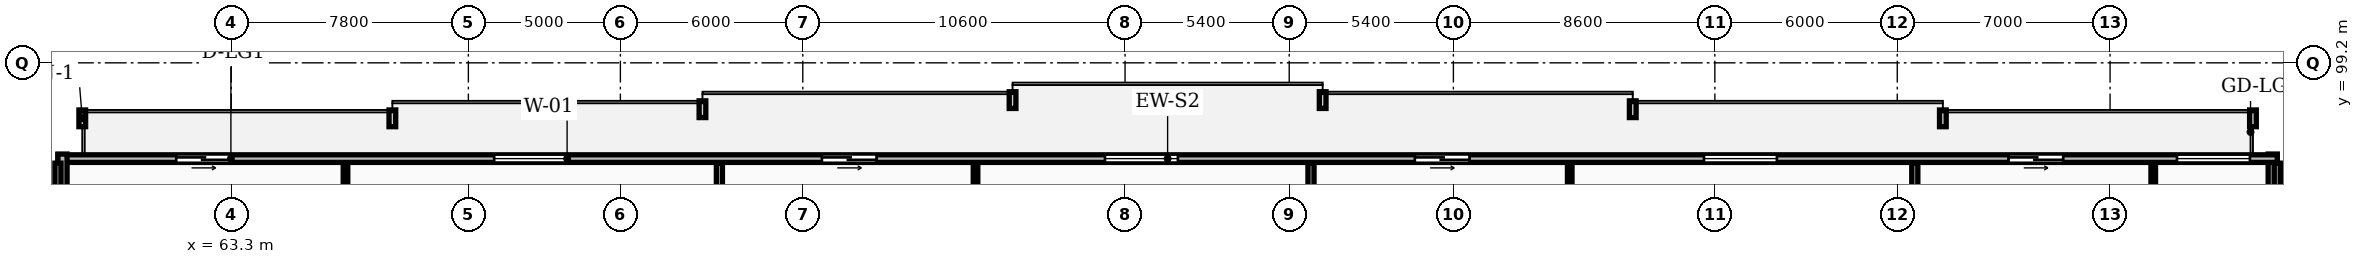
"""IFC4 building model, lengths in metres.
Left out: names, types, materials, properties, quantities, classifications, styles, units other than length and angle.
Written with IfcOpenShell. Run it as: python <this file> out.ifc"""

import sys

from ifc_helpers import new_model, si_unit, direction, frame, frame_2d, origin, place, context, subcontext, project, spatial, rectangle, extrude, element, fill, save


model = new_model("IFC4")
c1 = context("Model", 3, precision=1e-05, world=origin(), true_north=direction((0.0, 1.0)))
c2 = subcontext(c1, "Body", "Model", "MODEL_VIEW")
j1 = project(units=[si_unit("LENGTHUNIT", "METRE"), si_unit("PLANEANGLEUNIT", "RADIAN")], contexts=[c1])
p1 = place(None, origin())
s1 = spatial("IfcSite", under=j1, at=p1, CompositionType="ELEMENT")
p2 = place(p1, origin())
s2 = spatial("IfcBuilding", under=s1, at=p2, CompositionType="ELEMENT")
p3 = place(p2, frame((0.0, 0.0, 150.1)))
s3 = spatial("IfcBuildingStorey", under=s2, at=p3, CompositionType="ELEMENT", Elevation=150.1)
p4 = place(p3, frame((130.45, 92.6, 0.0), z_axis=(0.0, 0.0, 1.0), x_axis=(0.0, 1.0, 0.0)))
e1 = element("IfcWall", 1, at=p4, inside=s3, PredefinedType="STANDARD", context=c2, shape_type="SweptSolid", body=[
    extrude(rectangle(XDim=3.6, YDim=0.3, at=frame_2d((1.8, 0.0))), origin(), (0.0, 0.0, 1.0), 3.31),
])
p5 = place(p3, frame((130.6, 96.05, 0.0), z_axis=(0.0, 0.0, 1.0), x_axis=(-1.0, 0.0, 0.0)))
e2 = element("IfcWall", 2, at=p5, inside=s3, PredefinedType="STANDARD", context=c2, shape_type="SweptSolid", body=[
    extrude(rectangle(XDim=73.0, YDim=0.25, at=frame_2d((36.5, 0.0))), origin(), (0.0, 0.0, 1.0), 3.31),
])
p6 = place(p5, frame((67.311, 0.0, 0.0)))
e3 = element("IfcOpeningElement", 3, at=p6, cuts=e2, PredefinedType="OPENING", context=c2, shape_type="SweptSolid", body=[
    extrude(rectangle(XDim=1.8, YDim=2.2, at=frame_2d((0.9, 1.1))), frame((0.0, 0.135, 0.0), z_axis=(0.0, -1.0, 0.0), x_axis=(1.0, 0.0, 0.0)), (0.0, 0.0, 1.0), 0.27),
])
p7 = place(p5, frame((56.252, 0.0, 0.85)))
e4 = element("IfcOpeningElement", 4, at=p7, cuts=e2, PredefinedType="OPENING", context=c2, shape_type="SweptSolid", body=[
    extrude(rectangle(XDim=2.4, YDim=1.9, at=frame_2d((1.2, 0.95))), frame((0.0, 0.135, 0.0), z_axis=(0.0, -1.0, 0.0), x_axis=(1.0, 0.0, 0.0)), (0.0, 0.0, 1.0), 0.27),
])
p8 = place(p5, frame((46.071, 0.0, 0.0)))
e5 = element("IfcOpeningElement", 5, at=p8, cuts=e2, PredefinedType="OPENING", context=c2, shape_type="SweptSolid", body=[
    extrude(rectangle(XDim=1.8, YDim=2.2, at=frame_2d((0.9, 1.1))), frame((0.0, 0.135, 0.0), z_axis=(0.0, -1.0, 0.0), x_axis=(1.0, 0.0, 0.0)), (0.0, 0.0, 1.0), 0.27),
])
p9 = place(p5, frame((36.161, 0.0, 0.85)))
e6 = element("IfcOpeningElement", 6, at=p9, cuts=e2, PredefinedType="OPENING", context=c2, shape_type="SweptSolid", body=[
    extrude(rectangle(XDim=2.4, YDim=1.9, at=frame_2d((1.2, 0.95))), frame((0.0, 0.135, 0.0), z_axis=(0.0, -1.0, 0.0), x_axis=(1.0, 0.0, 0.0)), (0.0, 0.0, 1.0), 0.27),
])
p10 = place(p5, frame((26.569, 0.0, 0.0)))
e7 = element("IfcOpeningElement", 7, at=p10, cuts=e2, PredefinedType="OPENING", context=c2, shape_type="SweptSolid", body=[
    extrude(rectangle(XDim=1.8, YDim=2.2, at=frame_2d((0.9, 1.1))), frame((0.0, 0.135, 0.0), z_axis=(0.0, -1.0, 0.0), x_axis=(1.0, 0.0, 0.0)), (0.0, 0.0, 1.0), 0.27),
])
p11 = place(p5, frame((16.458, 0.0, 0.85)))
e8 = element("IfcOpeningElement", 8, at=p11, cuts=e2, PredefinedType="OPENING", context=c2, shape_type="SweptSolid", body=[
    extrude(rectangle(XDim=2.4, YDim=1.9, at=frame_2d((1.2, 0.95))), frame((0.0, 0.135, 0.0), z_axis=(0.0, -1.0, 0.0), x_axis=(1.0, 0.0, 0.0)), (0.0, 0.0, 1.0), 0.27),
])
p12 = place(p5, frame((7.042, 0.0, 0.0)))
e9 = element("IfcOpeningElement", 9, at=p12, cuts=e2, PredefinedType="OPENING", context=c2, shape_type="SweptSolid", body=[
    extrude(rectangle(XDim=1.8, YDim=2.2, at=frame_2d((0.9, 1.1))), frame((0.0, 0.135, 0.0), z_axis=(0.0, -1.0, 0.0), x_axis=(1.0, 0.0, 0.0)), (0.0, 0.0, 1.0), 0.27),
])
p13 = place(p5, frame((0.9, 0.0, 0.85)))
e10 = element("IfcOpeningElement", 10, at=p13, cuts=e2, PredefinedType="OPENING", context=c2, shape_type="SweptSolid", body=[
    extrude(rectangle(XDim=2.4, YDim=1.9, at=frame_2d((1.2, 0.95))), frame((0.0, 0.135, 0.0), z_axis=(0.0, -1.0, 0.0), x_axis=(1.0, 0.0, 0.0)), (0.0, 0.0, 1.0), 0.27),
])
p14 = place(p3, frame((57.75, 96.2, 0.0), z_axis=(0.0, 0.0, 1.0), x_axis=(0.0, -1.0, 0.0)))
e11 = element("IfcWall", 11, at=p14, inside=s3, PredefinedType="STANDARD", context=c2, shape_type="SweptSolid", body=[
    extrude(rectangle(XDim=3.6, YDim=0.3, at=frame_2d((1.8, 0.0))), origin(), (0.0, 0.0, 1.0), 3.31),
])
for number, where, z_axis, x_axis in (
    (12, (57.6, 69.83, 0.0), (0.0, 0.0, 1.0), (0.0, 1.0, 0.0)),
    (13, (130.6, 69.83, 0.0), (0.0, 0.0, 1.0), (0.0, 1.0, 0.0)),
    (14, (79.357, 69.83, 0.0), (0.0, 0.0, 1.0), (0.0, 1.0, 0.0)),
):
    element("IfcWall", number, at=place(p3, frame(where, z_axis=z_axis, x_axis=x_axis)), inside=s3, PredefinedType="PARTITIONING", context=c2, shape_type="SweptSolid", body=[
        extrude(rectangle(XDim=26.07, YDim=0.2, at=frame_2d((13.035, 0.0))), origin(), (0.0, 0.0, 1.0), 3.31),
    ])
p15 = place(p3, frame((67.059, 91.43, 0.0), z_axis=(0.0, 0.0, 1.0), x_axis=(0.0, 1.0, 0.0)))
e15 = element("IfcWall", 15, at=p15, inside=s3, PredefinedType="PARTITIONING", context=c2, shape_type="SweptSolid", body=[
    extrude(rectangle(XDim=4.47, YDim=0.15, at=frame_2d((2.235, 0.0))), origin(), (0.0, 0.0, 1.0), 3.31),
])
p16 = place(p3, frame((98.816, 69.83, 0.0), z_axis=(0.0, 0.0, 1.0), x_axis=(0.0, 1.0, 0.0)))
e16 = element("IfcWall", 16, at=p16, inside=s3, PredefinedType="PARTITIONING", context=c2, shape_type="SweptSolid", body=[
    extrude(rectangle(XDim=26.07, YDim=0.2, at=frame_2d((13.035, 0.0))), origin(), (0.0, 0.0, 1.0), 3.31),
])
p17 = place(p3, frame((87.781, 91.43, 0.0), z_axis=(0.0, 0.0, 1.0), x_axis=(0.0, 1.0, 0.0)))
e17 = element("IfcWall", 17, at=p17, inside=s3, PredefinedType="PARTITIONING", context=c2, shape_type="SweptSolid", body=[
    extrude(rectangle(XDim=4.47, YDim=0.15, at=frame_2d((2.235, 0.0))), origin(), (0.0, 0.0, 1.0), 3.31),
])
p18 = place(p3, frame((118.677, 69.83, 0.0), z_axis=(0.0, 0.0, 1.0), x_axis=(0.0, 1.0, 0.0)))
e18 = element("IfcWall", 18, at=p18, inside=s3, PredefinedType="PARTITIONING", context=c2, shape_type="SweptSolid", body=[
    extrude(rectangle(XDim=26.07, YDim=0.2, at=frame_2d((13.035, 0.0))), origin(), (0.0, 0.0, 1.0), 3.31),
])
p19 = place(p3, frame((107.327, 91.43, 0.0), z_axis=(0.0, 0.0, 1.0), x_axis=(0.0, 1.0, 0.0)))
e19 = element("IfcWall", 19, at=p19, inside=s3, PredefinedType="PARTITIONING", context=c2, shape_type="SweptSolid", body=[
    extrude(rectangle(XDim=4.47, YDim=0.15, at=frame_2d((2.235, 0.0))), origin(), (0.0, 0.0, 1.0), 3.31),
])
p20 = place(p3, frame((126.52, 86.29, 0.0), z_axis=(0.0, 0.0, 1.0), x_axis=(0.0, 1.0, 0.0)))
e20 = element("IfcWall", 20, at=p20, inside=s3, PredefinedType="PARTITIONING", context=c2, shape_type="SweptSolid", body=[
    extrude(rectangle(XDim=9.61, YDim=0.15, at=frame_2d((4.805, 0.0))), origin(), (0.0, 0.0, 1.0), 3.31),
])
p21 = place(p20, frame((1.43, 0.0, 0.0)))
e21 = element("IfcOpeningElement", 21, at=p21, cuts=e20, PredefinedType="OPENING", context=c2, shape_type="SweptSolid", body=[
    extrude(rectangle(XDim=0.84, YDim=2.04, at=frame_2d((0.42, 1.02))), frame((0.0, 0.085, 0.0), z_axis=(0.0, -1.0, 0.0), x_axis=(1.0, 0.0, 0.0)), (0.0, 0.0, 1.0), 0.17),
])
p22 = place(p20, frame((2.705, 0.0, 0.0)))
e22 = element("IfcOpeningElement", 22, at=p22, cuts=e20, PredefinedType="OPENING", context=c2, shape_type="SweptSolid", body=[
    extrude(rectangle(XDim=0.84, YDim=2.04, at=frame_2d((0.42, 1.02))), frame((0.0, 0.085, 0.0), z_axis=(0.0, -1.0, 0.0), x_axis=(1.0, 0.0, 0.0)), (0.0, 0.0, 1.0), 0.17),
])
p23 = place(p20, frame((6.314, 0.0, 0.0)))
e23 = element("IfcOpeningElement", 23, at=p23, cuts=e20, PredefinedType="OPENING", context=c2, shape_type="SweptSolid", body=[
    extrude(rectangle(XDim=0.88, YDim=2.06, at=frame_2d((0.44, 1.03))), frame((0.0, 0.085, 0.0), z_axis=(0.0, -1.0, 0.0), x_axis=(1.0, 0.0, 0.0)), (0.0, 0.0, 1.0), 0.17),
])
p24 = place(p6, origin())
e24 = element("IfcDoor", 24, at=p24, inside=s3, OperationType="SLIDING_TO_LEFT", PredefinedType="DOOR", context=c2, shape_type="SweptSolid", body=[
    extrude(rectangle(XDim=1.8, YDim=2.2, at=frame_2d((0.9, 1.1))), frame((0.0, 0.025, 0.0), z_axis=(0.0, -1.0, 0.0), x_axis=(1.0, 0.0, 0.0)), (0.0, 0.0, 1.0), 0.05),
])
fill(e3, e24)
p25 = place(p7, origin())
e25 = element("IfcWindow", 25, at=p25, inside=s3, PartitioningType="DOUBLE_PANEL_VERTICAL", PredefinedType="WINDOW", context=c2, shape_type="SweptSolid", body=[
    extrude(rectangle(XDim=2.4, YDim=1.9, at=frame_2d((1.2, 0.95))), frame((0.0, 0.03, 0.0), z_axis=(0.0, -1.0, 0.0), x_axis=(1.0, 0.0, 0.0)), (0.0, 0.0, 1.0), 0.06),
])
fill(e4, e25)
p26 = place(p8, origin())
e26 = element("IfcDoor", 26, at=p26, inside=s3, OperationType="SLIDING_TO_LEFT", PredefinedType="DOOR", context=c2, shape_type="SweptSolid", body=[
    extrude(rectangle(XDim=1.8, YDim=2.2, at=frame_2d((0.9, 1.1))), frame((0.0, 0.025, 0.0), z_axis=(0.0, -1.0, 0.0), x_axis=(1.0, 0.0, 0.0)), (0.0, 0.0, 1.0), 0.05),
])
fill(e5, e26)
p27 = place(p9, origin())
e27 = element("IfcWindow", 27, at=p27, inside=s3, PartitioningType="DOUBLE_PANEL_VERTICAL", PredefinedType="WINDOW", context=c2, shape_type="SweptSolid", body=[
    extrude(rectangle(XDim=2.4, YDim=1.9, at=frame_2d((1.2, 0.95))), frame((0.0, 0.03, 0.0), z_axis=(0.0, -1.0, 0.0), x_axis=(1.0, 0.0, 0.0)), (0.0, 0.0, 1.0), 0.06),
])
fill(e6, e27)
p28 = place(p10, origin())
e28 = element("IfcDoor", 28, at=p28, inside=s3, OperationType="SLIDING_TO_LEFT", PredefinedType="DOOR", context=c2, shape_type="SweptSolid", body=[
    extrude(rectangle(XDim=1.8, YDim=2.2, at=frame_2d((0.9, 1.1))), frame((0.0, 0.025, 0.0), z_axis=(0.0, -1.0, 0.0), x_axis=(1.0, 0.0, 0.0)), (0.0, 0.0, 1.0), 0.05),
])
fill(e7, e28)
p29 = place(p11, origin())
e29 = element("IfcWindow", 29, at=p29, inside=s3, PartitioningType="DOUBLE_PANEL_VERTICAL", PredefinedType="WINDOW", context=c2, shape_type="SweptSolid", body=[
    extrude(rectangle(XDim=2.4, YDim=1.9, at=frame_2d((1.2, 0.95))), frame((0.0, 0.03, 0.0), z_axis=(0.0, -1.0, 0.0), x_axis=(1.0, 0.0, 0.0)), (0.0, 0.0, 1.0), 0.06),
])
fill(e8, e29)
p30 = place(p12, origin())
e30 = element("IfcDoor", 30, at=p30, inside=s3, OperationType="SLIDING_TO_LEFT", PredefinedType="DOOR", context=c2, shape_type="SweptSolid", body=[
    extrude(rectangle(XDim=1.8, YDim=2.2, at=frame_2d((0.9, 1.1))), frame((0.0, 0.025, 0.0), z_axis=(0.0, -1.0, 0.0), x_axis=(1.0, 0.0, 0.0)), (0.0, 0.0, 1.0), 0.05),
])
fill(e9, e30)
p31 = place(p13, origin())
e31 = element("IfcWindow", 31, at=p31, inside=s3, PartitioningType="DOUBLE_PANEL_VERTICAL", PredefinedType="WINDOW", context=c2, shape_type="SweptSolid", body=[
    extrude(rectangle(XDim=2.4, YDim=1.9, at=frame_2d((1.2, 0.95))), frame((0.0, 0.03, 0.0), z_axis=(0.0, -1.0, 0.0), x_axis=(1.0, 0.0, 0.0)), (0.0, 0.0, 1.0), 0.06),
])
fill(e10, e31)
save(model, sys.argv[1])
